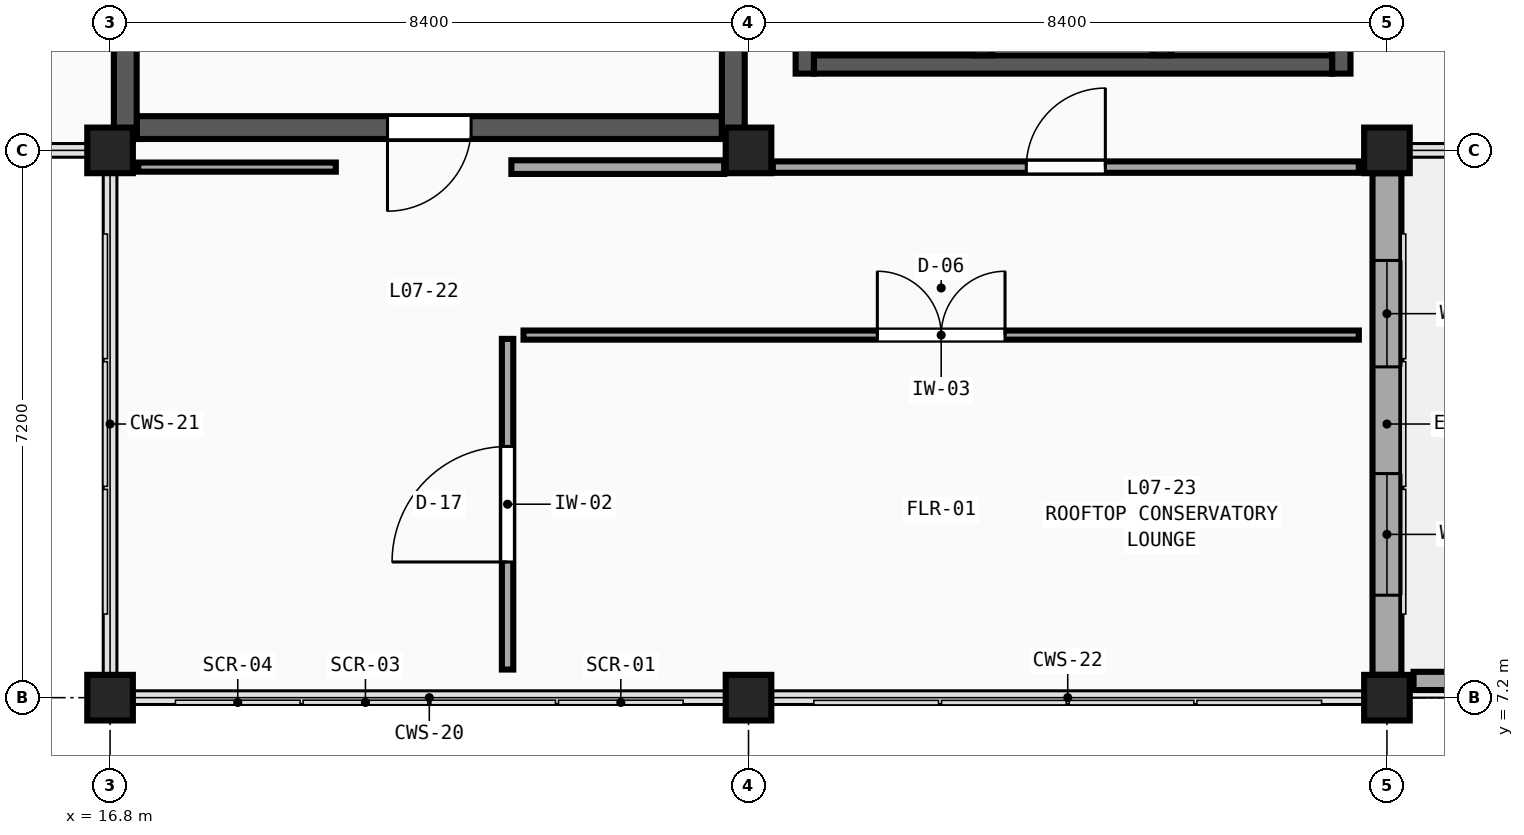
"""IFC4 building model, lengths in metres.
Left out: names, types, materials, properties, quantities, classifications, styles, units other than length and angle.
Written with IfcOpenShell. Run it as: python <this file> out.ifc"""

import sys

from ifc_helpers import new_model, si_unit, direction, frame, frame_2d, origin, origin_2d, place, context, subcontext, project, spatial, rectangle, extrude, element, fill, save


model = new_model("IFC4")
c1 = context("Model", 3, precision=1e-05, world=origin(), true_north=direction((0.0, 1.0)))
c2 = subcontext(c1, "Body", "Model", "MODEL_VIEW")
j1 = project(units=[si_unit("LENGTHUNIT", "METRE"), si_unit("PLANEANGLEUNIT", "RADIAN")], contexts=[c1])
p1 = place(None, origin())
s1 = spatial("IfcSite", under=j1, at=p1, CompositionType="ELEMENT")
p2 = place(p1, origin())
s2 = spatial("IfcBuilding", under=s1, at=p2, CompositionType="ELEMENT")
p3 = place(p2, frame((0.0, 0.0, 32.1)))
s3 = spatial("IfcBuildingStorey", under=s2, at=p3, CompositionType="ELEMENT", Elevation=32.1)
for number, where, z_axis, x_axis in (
    (1, (16.8, 7.2, 0.0), (0.0, 0.0, 1.0), (1.0, 0.0, 0.0)),
    (2, (16.8, 14.4, 0.0), (0.0, 0.0, 1.0), (1.0, 0.0, 0.0)),
    (3, (25.2, 7.2, 0.0), (0.0, 0.0, 1.0), (1.0, 0.0, 0.0)),
    (4, (25.2, 14.4, 0.0), (0.0, 0.0, 1.0), (1.0, 0.0, 0.0)),
    (5, (33.6, 7.2, 0.0), (0.0, 0.0, 1.0), (1.0, 0.0, 0.0)),
    (6, (33.6, 14.4, 0.0), (0.0, 0.0, 1.0), (1.0, 0.0, 0.0)),
):
    element("IfcColumn", number, at=place(p3, frame(where, z_axis=z_axis, x_axis=x_axis)), inside=s3, PredefinedType="COLUMN", context=c2, shape_type="SweptSolid", body=[
        extrude(rectangle(XDim=0.6, YDim=0.6, at=origin_2d()), origin(), (0.0, 0.0, 1.0), 4.5),
    ])
p4 = place(p3, frame((33.6, 14.1, 0.0), z_axis=(0.0, 0.0, 1.0), x_axis=(0.0, -1.0, 0.0)))
e7 = element("IfcWall", 7, at=p4, inside=s3, PredefinedType="SOLIDWALL", context=c2, shape_type="SweptSolid", body=[
    extrude(rectangle(XDim=6.6, YDim=0.38, at=frame_2d((3.3, 0.0))), origin(), (0.0, 0.0, 1.0), 3.69),
])
p5 = place(p4, frame((1.148, 0.0, 0.75)))
e8 = element("IfcOpeningElement", 8, at=p5, cuts=e7, PredefinedType="OPENING", context=c2, shape_type="SweptSolid", body=[
    extrude(rectangle(XDim=1.4, YDim=2.08, at=frame_2d((0.7, 1.04))), frame((0.0, 0.21, 0.0), z_axis=(0.0, -1.0, 0.0), x_axis=(1.0, 0.0, 0.0)), (0.0, 0.0, 1.0), 0.42),
])
p6 = place(p4, frame((3.952, 0.0, 0.75)))
e9 = element("IfcOpeningElement", 9, at=p6, cuts=e7, PredefinedType="OPENING", context=c2, shape_type="SweptSolid", body=[
    extrude(rectangle(XDim=1.6, YDim=2.08, at=frame_2d((0.8, 1.04))), frame((0.0, 0.21, 0.0), z_axis=(0.0, -1.0, 0.0), x_axis=(1.0, 0.0, 0.0)), (0.0, 0.0, 1.0), 0.42),
])
p7 = place(p3, frame((50.05, 7.42, 0.0), z_axis=(0.0, 0.0, 1.0), x_axis=(-1.0, 0.0, 0.0)))
e10 = element("IfcWall", 10, at=p7, inside=s3, PredefinedType="PARAPET", context=c2, shape_type="SweptSolid", body=[
    extrude(rectangle(XDim=16.1, YDim=0.24, at=frame_2d((8.05, 0.0))), origin(), (0.0, 0.0, 1.0), 1.15),
])
p8 = place(p3, frame((24.85, 14.7, 0.0), z_axis=(0.0, 0.0, 1.0), x_axis=(-1.0, 0.0, 0.0)))
e11 = element("IfcWall", 11, at=p8, inside=s3, PredefinedType="SHEAR", context=c2, shape_type="SweptSolid", body=[
    extrude(rectangle(XDim=7.7, YDim=0.3, at=frame_2d((3.85, 0.0))), origin(), (0.0, 0.0, 1.0), 4.5),
])
p9 = place(p8, frame((3.3, 0.0, 0.0)))
e12 = element("IfcOpeningElement", 12, at=p9, cuts=e11, PredefinedType="OPENING", context=c2, shape_type="SweptSolid", body=[
    extrude(rectangle(XDim=1.1, YDim=2.2, at=frame_2d((0.55, 1.1))), frame((0.0, 0.17, 0.0), z_axis=(0.0, -1.0, 0.0), x_axis=(1.0, 0.0, 0.0)), (0.0, 0.0, 1.0), 0.34),
])
for number, where, z_axis, x_axis in (
    (13, (17.0, 22.8, 0.0), (0.0, 0.0, 1.0), (0.0, -1.0, 0.0)),
    (14, (25.0, 14.55, 0.0), (0.0, 0.0, 1.0), (0.0, 1.0, 0.0)),
):
    element("IfcWall", number, at=place(p3, frame(where, z_axis=z_axis, x_axis=x_axis)), inside=s3, PredefinedType="SHEAR", context=c2, shape_type="SweptSolid", body=[
        extrude(rectangle(XDim=8.25, YDim=0.3, at=frame_2d((4.125, 0.0))), origin(), (0.0, 0.0, 1.0), 4.5),
    ])
p10 = place(p3, frame((26.06, 15.53, 0.0), z_axis=(0.0, 0.0, 1.0), x_axis=(1.0, 0.0, 0.0)))
e15 = element("IfcWall", 15, at=p10, inside=s3, PredefinedType="SHEAR", context=c2, shape_type="SweptSolid", body=[
    extrude(rectangle(XDim=6.82, YDim=0.24, at=frame_2d((3.41, 0.0))), origin(), (0.0, 0.0, 1.0), 5.35),
])
for number, where, z_axis, x_axis in (
    (16, (25.94, 18.39, 0.0), (0.0, 0.0, 1.0), (0.0, -1.0, 0.0)),
    (17, (33.0, 15.41, 0.0), (0.0, 0.0, 1.0), (0.0, 1.0, 0.0)),
):
    element("IfcWall", number, at=place(p3, frame(where, z_axis=z_axis, x_axis=x_axis)), inside=s3, PredefinedType="SHEAR", context=c2, shape_type="SweptSolid", body=[
        extrude(rectangle(XDim=2.98, YDim=0.24, at=frame_2d((1.49, 0.0))), origin(), (0.0, 0.0, 1.0), 5.35),
    ])
for number, where, z_axis, x_axis in (
    (18, (28.28, 15.65, 0.0), (0.0, 0.0, 1.0), (0.0, 1.0, 0.0)),
    (19, (30.64, 15.65, 0.0), (0.0, 0.0, 1.0), (0.0, 1.0, 0.0)),
):
    element("IfcWall", number, at=place(p3, frame(where, z_axis=z_axis, x_axis=x_axis)), inside=s3, PredefinedType="SHEAR", context=c2, shape_type="SweptSolid", body=[
        extrude(rectangle(XDim=2.5, YDim=0.24, at=frame_2d((1.25, 0.0))), origin(), (0.0, 0.0, 1.0), 5.35),
    ])
p11 = place(p3, frame((22.08, 14.18, 0.0), z_axis=(0.0, 0.0, 1.0), x_axis=(1.0, 0.0, 0.0)))
e20 = element("IfcWall", 20, at=p11, inside=s3, PredefinedType="PARTITIONING", context=c2, shape_type="SweptSolid", body=[
    extrude(rectangle(XDim=2.8, YDim=0.18, at=frame_2d((1.4, 0.0))), origin(), (0.0, 0.0, 1.0), 3.79),
])
p12 = place(p3, frame((25.52, 14.18, 0.0), z_axis=(0.0, 0.0, 1.0), x_axis=(1.0, 0.0, 0.0)))
e21 = element("IfcWall", 21, at=p12, inside=s3, PredefinedType="PARTITIONING", context=c2, shape_type="SweptSolid", body=[
    extrude(rectangle(XDim=7.71, YDim=0.15, at=frame_2d((3.855, 0.0))), origin(), (0.0, 0.0, 1.0), 3.79),
])
p13 = place(p12, frame((3.335, 0.0, 0.0)))
e22 = element("IfcOpeningElement", 22, at=p13, cuts=e21, PredefinedType="OPENING", context=c2, shape_type="SweptSolid", body=[
    extrude(rectangle(XDim=1.04, YDim=2.05, at=frame_2d((0.52, 1.025))), frame((0.0, 0.095, 0.0), z_axis=(0.0, -1.0, 0.0), x_axis=(1.0, 0.0, 0.0)), (0.0, 0.0, 1.0), 0.19),
])
p14 = place(p3, frame((22.24, 11.97, 0.0), z_axis=(0.0, 0.0, 1.0), x_axis=(1.0, 0.0, 0.0)))
e23 = element("IfcWall", 23, at=p14, inside=s3, PredefinedType="PARTITIONING", context=c2, shape_type="SweptSolid", body=[
    extrude(rectangle(XDim=10.99, YDim=0.12, at=frame_2d((5.495, 0.0))), origin(), (0.0, 0.0, 1.0), 4.24),
])
p15 = place(p14, frame((4.655, 0.0, 0.0)))
e24 = element("IfcOpeningElement", 24, at=p15, cuts=e23, PredefinedType="OPENING", context=c2, shape_type="SweptSolid", body=[
    extrude(rectangle(XDim=1.68, YDim=2.05, at=frame_2d((0.84, 1.025))), frame((0.0, 0.08, 0.0), z_axis=(0.0, -1.0, 0.0), x_axis=(1.0, 0.0, 0.0)), (0.0, 0.0, 1.0), 0.16),
])
p16 = place(p3, frame((22.03, 7.57, 0.0), z_axis=(0.0, 0.0, 1.0), x_axis=(0.0, 1.0, 0.0)))
e25 = element("IfcWall", 25, at=p16, inside=s3, PredefinedType="PARTITIONING", context=c2, shape_type="SweptSolid", body=[
    extrude(rectangle(XDim=4.35, YDim=0.15, at=frame_2d((2.175, 0.0))), origin(), (0.0, 0.0, 1.0), 4.24),
])
p17 = place(p16, frame((1.415, 0.0, 0.0)))
e26 = element("IfcOpeningElement", 26, at=p17, cuts=e25, PredefinedType="OPENING", context=c2, shape_type="SweptSolid", body=[
    extrude(rectangle(XDim=1.52, YDim=2.21, at=frame_2d((0.76, 1.105))), frame((0.0, 0.095, 0.0), z_axis=(0.0, -1.0, 0.0), x_axis=(1.0, 0.0, 0.0)), (0.0, 0.0, 1.0), 0.19),
])
p18 = place(p3, frame((17.17, 14.18, 0.0), z_axis=(0.0, 0.0, 1.0), x_axis=(1.0, 0.0, 0.0)))
e27 = element("IfcWall", 27, at=p18, inside=s3, PredefinedType="PARTITIONING", context=c2, shape_type="SweptSolid", body=[
    extrude(rectangle(XDim=2.6, YDim=0.12, at=frame_2d((1.3, 0.0))), origin(), (0.0, 0.0, 1.0), 3.79),
])
p19 = place(p5, origin())
e28 = element("IfcWindow", 28, at=p19, inside=s3, PartitioningType="DOUBLE_PANEL_VERTICAL", PredefinedType="WINDOW", context=c2, shape_type="SweptSolid", body=[
    extrude(rectangle(XDim=1.4, YDim=2.08, at=frame_2d((0.7, 1.04))), frame((0.0, 0.03, 0.0), z_axis=(0.0, -1.0, 0.0), x_axis=(1.0, 0.0, 0.0)), (0.0, 0.0, 1.0), 0.06),
])
fill(e8, e28)
p20 = place(p6, origin())
e29 = element("IfcWindow", 29, at=p20, inside=s3, PartitioningType="DOUBLE_PANEL_VERTICAL", PredefinedType="WINDOW", context=c2, shape_type="SweptSolid", body=[
    extrude(rectangle(XDim=1.6, YDim=2.08, at=frame_2d((0.8, 1.04))), frame((0.0, 0.03, 0.0), z_axis=(0.0, -1.0, 0.0), x_axis=(1.0, 0.0, 0.0)), (0.0, 0.0, 1.0), 0.06),
])
fill(e9, e29)
p21 = place(p9, origin())
e30 = element("IfcDoor", 30, at=p21, inside=s3, OperationType="SINGLE_SWING_RIGHT", PredefinedType="DOOR", context=c2, shape_type="SweptSolid", body=[
    extrude(rectangle(XDim=1.1, YDim=2.2, at=frame_2d((0.55, 1.1))), frame((0.0, 0.025, 0.0), z_axis=(0.0, -1.0, 0.0), x_axis=(1.0, 0.0, 0.0)), (0.0, 0.0, 1.0), 0.05),
])
fill(e12, e30)
p22 = place(p13, origin())
e31 = element("IfcDoor", 31, at=p22, inside=s3, OperationType="SINGLE_SWING_RIGHT", PredefinedType="DOOR", context=c2, shape_type="SweptSolid", body=[
    extrude(rectangle(XDim=1.04, YDim=2.05, at=frame_2d((0.52, 1.025))), frame((0.0, 0.025, 0.0), z_axis=(0.0, -1.0, 0.0), x_axis=(1.0, 0.0, 0.0)), (0.0, 0.0, 1.0), 0.05),
])
fill(e22, e31)
p23 = place(p15, origin())
e32 = element("IfcDoor", 32, at=p23, inside=s3, OperationType="DOUBLE_DOOR_SINGLE_SWING", PredefinedType="DOOR", context=c2, shape_type="SweptSolid", body=[
    extrude(rectangle(XDim=1.68, YDim=2.05, at=frame_2d((0.84, 1.025))), frame((0.0, 0.025, 0.0), z_axis=(0.0, -1.0, 0.0), x_axis=(1.0, 0.0, 0.0)), (0.0, 0.0, 1.0), 0.05),
])
fill(e24, e32)
p24 = place(p17, origin())
e33 = element("IfcDoor", 33, at=p24, inside=s3, OperationType="SINGLE_SWING_LEFT", PredefinedType="DOOR", context=c2, shape_type="SweptSolid", body=[
    extrude(rectangle(XDim=1.52, YDim=2.21, at=frame_2d((0.76, 1.105))), frame((0.0, 0.025, 0.0), z_axis=(0.0, -1.0, 0.0), x_axis=(1.0, 0.0, 0.0)), (0.0, 0.0, 1.0), 0.05),
])
fill(e26, e33)
save(model, sys.argv[1])
